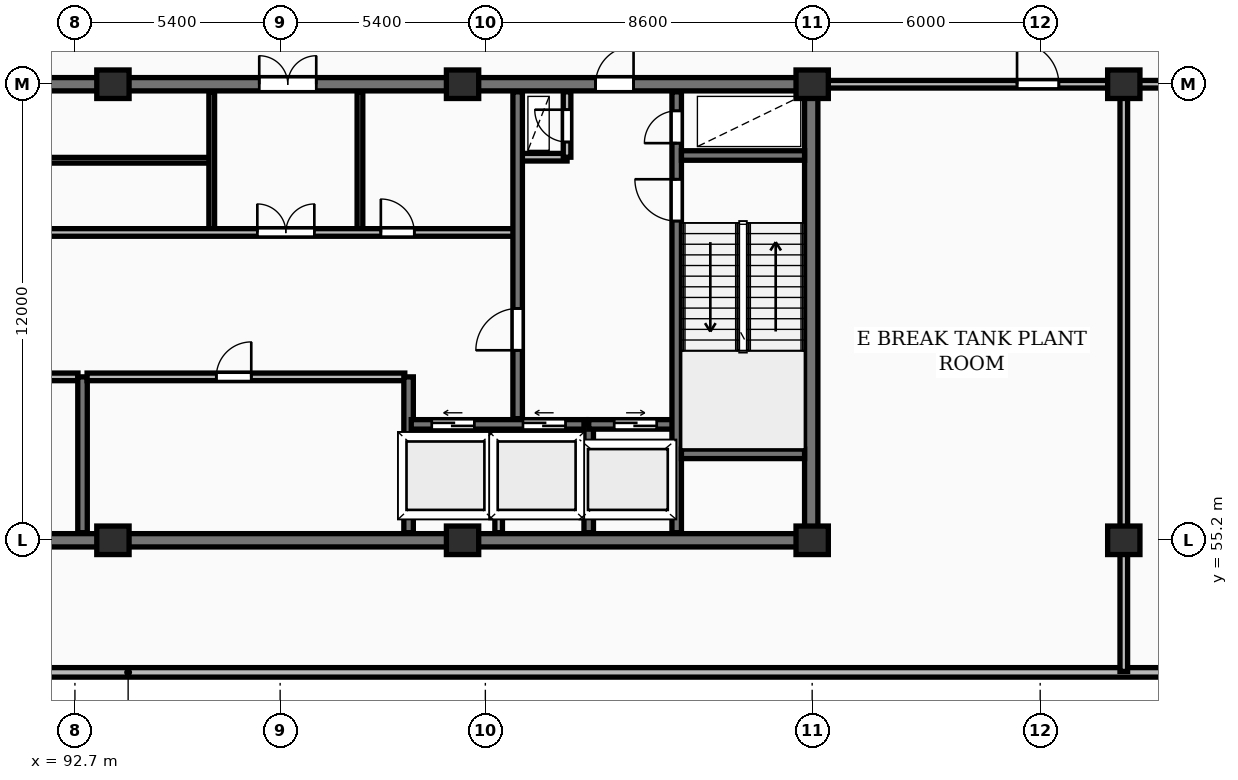
"""IFC4 building model, lengths in metres.
Left out: names, types, materials, properties, quantities, classifications, styles, units other than length and angle.
Written with IfcOpenShell. Run it as: python <this file> out.ifc"""

import sys

from ifc_helpers import new_model, si_unit, direction, frame, frame_2d, origin, origin_2d, place, context, subcontext, project, spatial, rectangle, extrude, element, fill, save


model = new_model("IFC4")
c1 = context("Model", 3, precision=1e-05, world=origin(), true_north=direction((0.0, 1.0)))
c2 = subcontext(c1, "Body", "Model", "MODEL_VIEW")
j1 = project(units=[si_unit("LENGTHUNIT", "METRE"), si_unit("PLANEANGLEUNIT", "RADIAN")], contexts=[c1])
p1 = place(None, origin())
s1 = spatial("IfcSite", under=j1, at=p1, CompositionType="ELEMENT")
p2 = place(p1, origin())
s2 = spatial("IfcBuilding", under=s1, at=p2, CompositionType="ELEMENT")
p3 = place(p2, frame((0.0, 0.0, 223.85)))
s3 = spatial("IfcBuildingStorey", under=s2, at=p3, CompositionType="ELEMENT", Elevation=223.85)
for number, where, z_axis, x_axis in (
    (1, (93.7, 55.2, 0.0), (0.0, 0.0, 1.0), (1.0, 0.0, 0.0)),
    (2, (93.7, 67.2, 0.0), (0.0, 0.0, 1.0), (1.0, 0.0, 0.0)),
    (3, (102.9, 55.2, 0.0), (0.0, 0.0, 1.0), (1.0, 0.0, 0.0)),
    (4, (102.9, 67.2, 0.0), (0.0, 0.0, 1.0), (1.0, 0.0, 0.0)),
    (5, (112.1, 55.2, 0.0), (0.0, 0.0, 1.0), (1.0, 0.0, 0.0)),
    (6, (112.1, 67.2, 0.0), (0.0, 0.0, 1.0), (1.0, 0.0, 0.0)),
    (7, (120.3, 55.2, 0.0), (0.0, 0.0, 1.0), (1.0, 0.0, 0.0)),
    (8, (120.3, 67.2, 0.0), (0.0, 0.0, 1.0), (1.0, 0.0, 0.0)),
):
    element("IfcColumn", number, at=place(p3, frame(where, z_axis=z_axis, x_axis=x_axis)), inside=s3, PredefinedType="COLUMN", context=c2, shape_type="SweptSolid", body=[
        extrude(rectangle(XDim=0.85, YDim=0.75, at=origin_2d()), origin(), (0.0, 0.0, 1.0), 4.8),
    ])
p4 = place(p3, frame((59.8, 51.725, 0.0), z_axis=(0.0, 0.0, 1.0), x_axis=(1.0, 0.0, 0.0)))
e9 = element("IfcWall", 9, at=p4, inside=s3, PredefinedType="SHEAR", context=c2, shape_type="SweptSolid", body=[
    extrude(rectangle(XDim=68.6, YDim=0.25, at=frame_2d((34.3, 0.0))), origin(), (0.0, 0.0, 1.0), 4.48),
])
p5 = place(p3, frame((75.95, 55.2, 0.0), z_axis=(0.0, 0.0, 1.0), x_axis=(1.0, 0.0, 0.0)))
e10 = element("IfcWall", 10, at=p5, inside=s3, PredefinedType="SHEAR", context=c2, shape_type="SweptSolid", body=[
    extrude(rectangle(XDim=36.3, YDim=0.35, at=frame_2d((18.15, 0.0))), origin(), (0.0, 0.0, 1.0), 4.8),
])
p6 = place(p3, frame((112.075, 55.375, 0.0), z_axis=(0.0, 0.0, 1.0), x_axis=(0.0, 1.0, 0.0)))
e11 = element("IfcWall", 11, at=p6, inside=s3, PredefinedType="SHEAR", context=c2, shape_type="SweptSolid", body=[
    extrude(rectangle(XDim=11.65, YDim=0.35, at=frame_2d((5.825, 0.0))), origin(), (0.0, 0.0, 1.0), 4.8),
])
p7 = place(p3, frame((75.95, 67.2, 0.0), z_axis=(0.0, 0.0, 1.0), x_axis=(1.0, 0.0, 0.0)))
e12 = element("IfcWall", 12, at=p7, inside=s3, PredefinedType="SHEAR", context=c2, shape_type="SweptSolid", body=[
    extrude(rectangle(XDim=36.3, YDim=0.35, at=frame_2d((18.15, 0.0))), origin(), (0.0, 0.0, 1.0), 4.8),
])
p8 = place(p7, frame((5.25, 0.0, 0.0)))
e13 = element("IfcOpeningElement", 13, at=p8, cuts=e12, PredefinedType="OPENING", context=c2, shape_type="SweptSolid", body=[
    extrude(rectangle(XDim=1.0, YDim=2.15, at=frame_2d((0.5, 1.075))), frame((0.0, 0.185, 0.0), z_axis=(0.0, -1.0, 0.0), x_axis=(1.0, 0.0, 0.0)), (0.0, 0.0, 1.0), 0.37),
])
p9 = place(p7, frame((21.6, 0.0, 0.0)))
e14 = element("IfcOpeningElement", 14, at=p9, cuts=e12, PredefinedType="OPENING", context=c2, shape_type="SweptSolid", body=[
    extrude(rectangle(XDim=1.5, YDim=2.2, at=frame_2d((0.75, 1.1))), frame((0.0, 0.185, 0.0), z_axis=(0.0, -1.0, 0.0), x_axis=(1.0, 0.0, 0.0)), (0.0, 0.0, 1.0), 0.37),
])
p10 = place(p7, frame((30.45, 0.0, 0.0)))
e15 = element("IfcOpeningElement", 15, at=p10, cuts=e12, PredefinedType="OPENING", context=c2, shape_type="SweptSolid", body=[
    extrude(rectangle(XDim=1.0, YDim=2.15, at=frame_2d((0.5, 1.075))), frame((0.0, 0.185, 0.0), z_axis=(0.0, -1.0, 0.0), x_axis=(1.0, 0.0, 0.0)), (0.0, 0.0, 1.0), 0.37),
])
p11 = place(p3, frame((84.42, 59.5, 0.0), z_axis=(0.0, 0.0, 1.0), x_axis=(1.0, 0.0, 0.0)))
e16 = element("IfcWall", 16, at=p11, inside=s3, PredefinedType="PARTITIONING", context=c2, shape_type="SweptSolid", body=[
    extrude(rectangle(XDim=8.36, YDim=0.2, at=frame_2d((4.18, 0.0))), origin(), (0.0, 0.0, 1.0), 4.48),
])
p12 = place(p11, frame((3.4, 0.0, 0.0)))
e17 = element("IfcOpeningElement", 17, at=p12, cuts=e16, PredefinedType="OPENING", context=c2, shape_type="SweptSolid", body=[
    extrude(rectangle(XDim=0.92, YDim=2.08, at=frame_2d((0.46, 1.04))), frame((0.0, 0.11, 0.0), z_axis=(0.0, -1.0, 0.0), x_axis=(1.0, 0.0, 0.0)), (0.0, 0.0, 1.0), 0.22),
])
p13 = place(p3, frame((92.9, 55.4, 0.0), z_axis=(0.0, 0.0, 1.0), x_axis=(0.0, 1.0, 0.0)))
e18 = element("IfcWall", 18, at=p13, inside=s3, PredefinedType="SHEAR", context=c2, shape_type="SweptSolid", body=[
    extrude(rectangle(XDim=4.1, YDim=0.25, at=frame_2d((2.05, 0.0))), origin(), (0.0, 0.0, 1.0), 4.8),
])
p14 = place(p3, frame((93.02, 59.5, 0.0), z_axis=(0.0, 0.0, 1.0), x_axis=(1.0, 0.0, 0.0)))
e19 = element("IfcWall", 19, at=p14, inside=s3, PredefinedType="PARTITIONING", context=c2, shape_type="SweptSolid", body=[
    extrude(rectangle(XDim=8.36, YDim=0.2, at=frame_2d((4.18, 0.0))), origin(), (0.0, 0.0, 1.0), 4.48),
])
p15 = place(p14, frame((3.4, 0.0, 0.0)))
e20 = element("IfcOpeningElement", 20, at=p15, cuts=e19, PredefinedType="OPENING", context=c2, shape_type="SweptSolid", body=[
    extrude(rectangle(XDim=0.92, YDim=2.08, at=frame_2d((0.46, 1.04))), frame((0.0, 0.11, 0.0), z_axis=(0.0, -1.0, 0.0), x_axis=(1.0, 0.0, 0.0)), (0.0, 0.0, 1.0), 0.22),
])
p16 = place(p3, frame((101.48, 55.4, 0.0), z_axis=(0.0, 0.0, 1.0), x_axis=(0.0, 1.0, 0.0)))
e21 = element("IfcWall", 21, at=p16, inside=s3, PredefinedType="SHEAR", context=c2, shape_type="SweptSolid", body=[
    extrude(rectangle(XDim=4.1, YDim=0.25, at=frame_2d((2.05, 0.0))), origin(), (0.0, 0.0, 1.0), 4.8),
])
p17 = place(p3, frame((103.85, 55.4, 0.0), z_axis=(0.0, 0.0, 1.0), x_axis=(0.0, 1.0, 0.0)))
e22 = element("IfcWall", 22, at=p17, inside=s3, PredefinedType="PARTITIONING", context=c2, shape_type="SweptSolid", body=[
    extrude(rectangle(XDim=2.72, YDim=0.2, at=frame_2d((1.36, 0.0))), origin(), (0.0, 0.0, 1.0), 4.48),
])
p18 = place(p3, frame((101.55, 58.25, 0.0), z_axis=(0.0, 0.0, 1.0), x_axis=(1.0, 0.0, 0.0)))
e23 = element("IfcWall", 23, at=p18, inside=s3, PredefinedType="SHEAR", context=c2, shape_type="SweptSolid", body=[
    extrude(rectangle(XDim=4.6, YDim=0.25, at=frame_2d((2.3, 0.0))), origin(), (0.0, 0.0, 1.0), 4.8),
])
p19 = place(p18, frame((0.54, 0.0, 0.0)))
e24 = element("IfcOpeningElement", 24, at=p19, cuts=e23, PredefinedType="OPENING", context=c2, shape_type="SweptSolid", body=[
    extrude(rectangle(XDim=1.12, YDim=2.12, at=frame_2d((0.56, 1.06))), frame((0.0, 0.135, 0.0), z_axis=(0.0, -1.0, 0.0), x_axis=(1.0, 0.0, 0.0)), (0.0, 0.0, 1.0), 0.27),
])
p20 = place(p18, frame((2.94, 0.0, 0.0)))
e25 = element("IfcOpeningElement", 25, at=p20, cuts=e23, PredefinedType="OPENING", context=c2, shape_type="SweptSolid", body=[
    extrude(rectangle(XDim=1.12, YDim=2.12, at=frame_2d((0.56, 1.06))), frame((0.0, 0.135, 0.0), z_axis=(0.0, -1.0, 0.0), x_axis=(1.0, 0.0, 0.0)), (0.0, 0.0, 1.0), 0.27),
])
p21 = place(p3, frame((106.22, 55.4, 0.0), z_axis=(0.0, 0.0, 1.0), x_axis=(0.0, 1.0, 0.0)))
e26 = element("IfcWall", 26, at=p21, inside=s3, PredefinedType="SHEAR", context=c2, shape_type="SweptSolid", body=[
    extrude(rectangle(XDim=2.85, YDim=0.25, at=frame_2d((1.425, 0.0))), origin(), (0.0, 0.0, 1.0), 4.8),
])
p22 = place(p3, frame((106.22, 58.25, 0.0), z_axis=(0.0, 0.0, 1.0), x_axis=(1.0, 0.0, 0.0)))
e27 = element("IfcWall", 27, at=p22, inside=s3, PredefinedType="SHEAR", context=c2, shape_type="SweptSolid", body=[
    extrude(rectangle(XDim=2.46, YDim=0.25, at=frame_2d((1.23, 0.0))), origin(), (0.0, 0.0, 1.0), 4.8),
])
p23 = place(p22, frame((0.67, 0.0, 0.0)))
e28 = element("IfcOpeningElement", 28, at=p23, cuts=e27, PredefinedType="OPENING", context=c2, shape_type="SweptSolid", body=[
    extrude(rectangle(XDim=1.12, YDim=2.12, at=frame_2d((0.56, 1.06))), frame((0.0, 0.135, 0.0), z_axis=(0.0, -1.0, 0.0), x_axis=(1.0, 0.0, 0.0)), (0.0, 0.0, 1.0), 0.27),
])
p24 = place(p3, frame((89.25, 65.2, 0.0), z_axis=(0.0, 0.0, 1.0), x_axis=(1.0, 0.0, 0.0)))
e29 = element("IfcWall", 29, at=p24, inside=s3, PredefinedType="PARTITIONING", context=c2, shape_type="SweptSolid", body=[
    extrude(rectangle(XDim=7.05, YDim=0.15, at=frame_2d((3.525, 0.0))), origin(), (0.0, 0.0, 1.0), 4.48),
])
p25 = place(p24, frame((1.6, 0.0, 0.0)))
e30 = element("IfcOpeningElement", 30, at=p25, cuts=e29, PredefinedType="OPENING", context=c2, shape_type="SweptSolid", body=[
    extrude(rectangle(XDim=0.88, YDim=2.06, at=frame_2d((0.44, 1.03))), frame((0.0, 0.085, 0.0), z_axis=(0.0, -1.0, 0.0), x_axis=(1.0, 0.0, 0.0)), (0.0, 0.0, 1.0), 0.17),
])
for number, where, z_axis, x_axis in (
    (31, (96.3, 63.4, 0.0), (0.0, 0.0, 1.0), (0.0, 1.0, 0.0)),
    (32, (100.2, 63.4, 0.0), (0.0, 0.0, 1.0), (0.0, 1.0, 0.0)),
):
    element("IfcWall", number, at=place(p3, frame(where, z_axis=z_axis, x_axis=x_axis)), inside=s3, PredefinedType="PARTITIONING", context=c2, shape_type="SweptSolid", body=[
        extrude(rectangle(XDim=3.6, YDim=0.15, at=frame_2d((1.8, 0.0))), origin(), (0.0, 0.0, 1.0), 4.48),
    ])
p26 = place(p3, frame((84.42, 63.3, 0.0), z_axis=(0.0, 0.0, 1.0), x_axis=(1.0, 0.0, 0.0)))
e33 = element("IfcWall", 33, at=p26, inside=s3, PredefinedType="PARTITIONING", context=c2, shape_type="SweptSolid", body=[
    extrude(rectangle(XDim=19.83, YDim=0.2, at=frame_2d((9.915, 0.0))), origin(), (0.0, 0.0, 1.0), 4.48),
])
p27 = place(p26, frame((1.15, 0.0, 0.0)))
e34 = element("IfcOpeningElement", 34, at=p27, cuts=e33, PredefinedType="OPENING", context=c2, shape_type="SweptSolid", body=[
    extrude(rectangle(XDim=0.85, YDim=2.05, at=frame_2d((0.425, 1.025))), frame((0.0, 0.11, 0.0), z_axis=(0.0, -1.0, 0.0), x_axis=(1.0, 0.0, 0.0)), (0.0, 0.0, 1.0), 0.22),
])
p28 = place(p26, frame((3.25, 0.0, 0.0)))
e35 = element("IfcOpeningElement", 35, at=p28, cuts=e33, PredefinedType="OPENING", context=c2, shape_type="SweptSolid", body=[
    extrude(rectangle(XDim=0.85, YDim=2.05, at=frame_2d((0.425, 1.025))), frame((0.0, 0.11, 0.0), z_axis=(0.0, -1.0, 0.0), x_axis=(1.0, 0.0, 0.0)), (0.0, 0.0, 1.0), 0.22),
])
p29 = place(p26, frame((13.08, 0.0, 0.0)))
e36 = element("IfcOpeningElement", 36, at=p29, cuts=e33, PredefinedType="OPENING", context=c2, shape_type="SweptSolid", body=[
    extrude(rectangle(XDim=1.5, YDim=2.2, at=frame_2d((0.75, 1.1))), frame((0.0, 0.11, 0.0), z_axis=(0.0, -1.0, 0.0), x_axis=(1.0, 0.0, 0.0)), (0.0, 0.0, 1.0), 0.22),
])
p30 = place(p26, frame((6.68, 0.0, 0.0)))
e37 = element("IfcOpeningElement", 37, at=p30, cuts=e33, PredefinedType="OPENING", context=c2, shape_type="SweptSolid", body=[
    extrude(rectangle(XDim=0.92, YDim=2.08, at=frame_2d((0.46, 1.04))), frame((0.0, 0.11, 0.0), z_axis=(0.0, -1.0, 0.0), x_axis=(1.0, 0.0, 0.0)), (0.0, 0.0, 1.0), 0.22),
])
p31 = place(p26, frame((16.33, 0.0, 0.0)))
e38 = element("IfcOpeningElement", 38, at=p31, cuts=e33, PredefinedType="OPENING", context=c2, shape_type="SweptSolid", body=[
    extrude(rectangle(XDim=0.88, YDim=2.06, at=frame_2d((0.44, 1.03))), frame((0.0, 0.11, 0.0), z_axis=(0.0, -1.0, 0.0), x_axis=(1.0, 0.0, 0.0)), (0.0, 0.0, 1.0), 0.22),
])
p32 = place(p3, frame((104.45, 65.28, 0.0), z_axis=(0.0, 0.0, 1.0), x_axis=(1.0, 0.0, 0.0)))
e39 = element("IfcWall", 39, at=p32, inside=s3, PredefinedType="PARTITIONING", context=c2, shape_type="SweptSolid", body=[
    extrude(rectangle(XDim=1.2, YDim=0.2, at=frame_2d((0.6, 0.0))), origin(), (0.0, 0.0, 1.0), 4.48),
])
p33 = place(p3, frame((105.65, 65.28, 0.0), z_axis=(0.0, 0.0, 1.0), x_axis=(0.0, 1.0, 0.0)))
e40 = element("IfcWall", 40, at=p33, inside=s3, PredefinedType="PARTITIONING", context=c2, shape_type="SweptSolid", body=[
    extrude(rectangle(XDim=1.72, YDim=0.2, at=frame_2d((0.86, 0.0))), origin(), (0.0, 0.0, 1.0), 4.48),
])
p34 = place(p33, frame((0.4, 0.0, 0.0)))
e41 = element("IfcOpeningElement", 41, at=p34, cuts=e40, PredefinedType="OPENING", context=c2, shape_type="SweptSolid", body=[
    extrude(rectangle(XDim=0.85, YDim=2.05, at=frame_2d((0.425, 1.025))), frame((0.0, 0.11, 0.0), z_axis=(0.0, -1.0, 0.0), x_axis=(1.0, 0.0, 0.0)), (0.0, 0.0, 1.0), 0.22),
])
p35 = place(p3, frame((104.35, 58.4, 0.0), z_axis=(0.0, 0.0, 1.0), x_axis=(0.0, 1.0, 0.0)))
e42 = element("IfcWall", 42, at=p35, inside=s3, PredefinedType="SHEAR", context=c2, shape_type="SweptSolid", body=[
    extrude(rectangle(XDim=8.6, YDim=0.25, at=frame_2d((4.3, 0.0))), origin(), (0.0, 0.0, 1.0), 4.8),
])
p36 = place(p35, frame((1.8, 0.0, 0.0)))
e43 = element("IfcOpeningElement", 43, at=p36, cuts=e42, PredefinedType="OPENING", context=c2, shape_type="SweptSolid", body=[
    extrude(rectangle(XDim=1.1, YDim=2.1, at=frame_2d((0.55, 1.05))), frame((0.0, 0.135, 0.0), z_axis=(0.0, -1.0, 0.0), x_axis=(1.0, 0.0, 0.0)), (0.0, 0.0, 1.0), 0.27),
])
p37 = place(p3, frame((108.535, 55.4, 0.0), z_axis=(0.0, 0.0, 1.0), x_axis=(0.0, 1.0, 0.0)))
e44 = element("IfcWall", 44, at=p37, inside=s3, PredefinedType="SHEAR", context=c2, shape_type="SweptSolid", body=[
    extrude(rectangle(XDim=11.6, YDim=0.25, at=frame_2d((5.8, 0.0))), origin(), (0.0, 0.0, 1.0), 4.8),
])
p38 = place(p37, frame((8.2, 0.0, 0.0)))
e45 = element("IfcOpeningElement", 45, at=p38, cuts=e44, PredefinedType="OPENING", context=c2, shape_type="SweptSolid", body=[
    extrude(rectangle(XDim=1.1, YDim=2.1, at=frame_2d((0.55, 1.05))), frame((0.0, 0.135, 0.0), z_axis=(0.0, -1.0, 0.0), x_axis=(1.0, 0.0, 0.0)), (0.0, 0.0, 1.0), 0.27),
])
p39 = place(p37, frame((10.25, 0.0, 0.0)))
e46 = element("IfcOpeningElement", 46, at=p39, cuts=e44, PredefinedType="OPENING", context=c2, shape_type="SweptSolid", body=[
    extrude(rectangle(XDim=0.85, YDim=2.05, at=frame_2d((0.425, 1.025))), frame((0.0, 0.135, 0.0), z_axis=(0.0, -1.0, 0.0), x_axis=(1.0, 0.0, 0.0)), (0.0, 0.0, 1.0), 0.27),
])
for number, where, z_axis, x_axis in (
    (47, (108.66, 57.475, 0.0), (0.0, 0.0, 1.0), (1.0, 0.0, 0.0)),
    (48, (108.66, 65.325, 0.0), (0.0, 0.0, 1.0), (1.0, 0.0, 0.0)),
):
    element("IfcWall", number, at=place(p3, frame(where, z_axis=z_axis, x_axis=x_axis)), inside=s3, PredefinedType="SHEAR", context=c2, shape_type="SweptSolid", body=[
        extrude(rectangle(XDim=3.24, YDim=0.25, at=frame_2d((1.62, 0.0))), origin(), (0.0, 0.0, 1.0), 4.8),
    ])
p40 = place(p3, frame((120.3, 51.75, 0.0), z_axis=(0.0, 0.0, 1.0), x_axis=(0.0, 1.0, 0.0)))
e49 = element("IfcWall", 49, at=p40, inside=s3, PredefinedType="PARTITIONING", context=c2, shape_type="SweptSolid", body=[
    extrude(rectangle(XDim=15.4, YDim=0.2, at=frame_2d((7.7, 0.0))), origin(), (0.0, 0.0, 1.0), 3.23),
])
p41 = place(p3, frame((112.25, 67.2, 0.0), z_axis=(0.0, 0.0, 1.0), x_axis=(1.0, 0.0, 0.0)))
e50 = element("IfcWall", 50, at=p41, inside=s3, PredefinedType="PARTITIONING", context=c2, shape_type="SweptSolid", body=[
    extrude(rectangle(XDim=16.1, YDim=0.2, at=frame_2d((8.05, 0.0))), origin(), (0.0, 0.0, 1.0), 3.23),
])
p42 = place(p41, frame((5.241, 0.0, 0.0)))
e51 = element("IfcOpeningElement", 51, at=p42, cuts=e50, PredefinedType="OPENING", context=c2, shape_type="SweptSolid", body=[
    extrude(rectangle(XDim=1.1, YDim=2.1, at=frame_2d((0.55, 1.05))), frame((0.0, 0.11, 0.0), z_axis=(0.0, -1.0, 0.0), x_axis=(1.0, 0.0, 0.0)), (0.0, 0.0, 1.0), 0.22),
])
p43 = place(p41, frame((9.77, 0.0, 0.0)))
e52 = element("IfcOpeningElement", 52, at=p43, cuts=e50, PredefinedType="OPENING", context=c2, shape_type="SweptSolid", body=[
    extrude(rectangle(XDim=1.1, YDim=2.1, at=frame_2d((0.55, 1.05))), frame((0.0, 0.11, 0.0), z_axis=(0.0, -1.0, 0.0), x_axis=(1.0, 0.0, 0.0)), (0.0, 0.0, 1.0), 0.22),
])
p44 = place(p9, origin())
e53 = element("IfcDoor", 53, at=p44, inside=s3, OperationType="DOUBLE_DOOR_SINGLE_SWING", PredefinedType="DOOR", context=c2, shape_type="SweptSolid", body=[
    extrude(rectangle(XDim=1.5, YDim=2.2, at=frame_2d((0.75, 1.1))), frame((0.0, 0.025, 0.0), z_axis=(0.0, -1.0, 0.0), x_axis=(1.0, 0.0, 0.0)), (0.0, 0.0, 1.0), 0.05),
])
fill(e14, e53)
p45 = place(p10, origin())
e54 = element("IfcDoor", 54, at=p45, inside=s3, OperationType="SINGLE_SWING_RIGHT", PredefinedType="DOOR", context=c2, shape_type="SweptSolid", body=[
    extrude(rectangle(XDim=1.0, YDim=2.15, at=frame_2d((0.5, 1.075))), frame((0.0, 0.025, 0.0), z_axis=(0.0, -1.0, 0.0), x_axis=(1.0, 0.0, 0.0)), (0.0, 0.0, 1.0), 0.05),
])
fill(e15, e54)
p46 = place(p15, origin())
e55 = element("IfcDoor", 55, at=p46, inside=s3, OperationType="SINGLE_SWING_RIGHT", PredefinedType="DOOR", context=c2, shape_type="SweptSolid", body=[
    extrude(rectangle(XDim=0.92, YDim=2.08, at=frame_2d((0.46, 1.04))), frame((0.0, 0.025, 0.0), z_axis=(0.0, -1.0, 0.0), x_axis=(1.0, 0.0, 0.0)), (0.0, 0.0, 1.0), 0.05),
])
fill(e20, e55)
p47 = place(p19, origin())
e56 = element("IfcDoor", 56, at=p47, inside=s3, OperationType="SLIDING_TO_LEFT", PredefinedType="DOOR", context=c2, shape_type="SweptSolid", body=[
    extrude(rectangle(XDim=1.12, YDim=2.12, at=frame_2d((0.56, 1.06))), frame((0.0, 0.025, 0.0), z_axis=(0.0, -1.0, 0.0), x_axis=(1.0, 0.0, 0.0)), (0.0, 0.0, 1.0), 0.05),
])
fill(e24, e56)
p48 = place(p20, origin())
e57 = element("IfcDoor", 57, at=p48, inside=s3, OperationType="SLIDING_TO_LEFT", PredefinedType="DOOR", context=c2, shape_type="SweptSolid", body=[
    extrude(rectangle(XDim=1.12, YDim=2.12, at=frame_2d((0.56, 1.06))), frame((0.0, 0.025, 0.0), z_axis=(0.0, -1.0, 0.0), x_axis=(1.0, 0.0, 0.0)), (0.0, 0.0, 1.0), 0.05),
])
fill(e25, e57)
p49 = place(p23, origin())
e58 = element("IfcDoor", 58, at=p49, inside=s3, OperationType="SLIDING_TO_RIGHT", PredefinedType="DOOR", context=c2, shape_type="SweptSolid", body=[
    extrude(rectangle(XDim=1.12, YDim=2.12, at=frame_2d((0.56, 1.06))), frame((0.0, 0.025, 0.0), z_axis=(0.0, -1.0, 0.0), x_axis=(1.0, 0.0, 0.0)), (0.0, 0.0, 1.0), 0.05),
])
fill(e28, e58)
p50 = place(p29, origin())
e59 = element("IfcDoor", 59, at=p50, inside=s3, OperationType="DOUBLE_DOOR_SINGLE_SWING", PredefinedType="DOOR", context=c2, shape_type="SweptSolid", body=[
    extrude(rectangle(XDim=1.5, YDim=2.2, at=frame_2d((0.75, 1.1))), frame((0.0, 0.025, 0.0), z_axis=(0.0, -1.0, 0.0), x_axis=(1.0, 0.0, 0.0)), (0.0, 0.0, 1.0), 0.05),
])
fill(e36, e59)
p51 = place(p31, origin())
e60 = element("IfcDoor", 60, at=p51, inside=s3, OperationType="SINGLE_SWING_LEFT", PredefinedType="DOOR", context=c2, shape_type="SweptSolid", body=[
    extrude(rectangle(XDim=0.88, YDim=2.06, at=frame_2d((0.44, 1.03))), frame((0.0, 0.025, 0.0), z_axis=(0.0, -1.0, 0.0), x_axis=(1.0, 0.0, 0.0)), (0.0, 0.0, 1.0), 0.05),
])
fill(e38, e60)
p52 = place(p34, origin())
e61 = element("IfcDoor", 61, at=p52, inside=s3, OperationType="SINGLE_SWING_RIGHT", PredefinedType="DOOR", context=c2, shape_type="SweptSolid", body=[
    extrude(rectangle(XDim=0.85, YDim=2.05, at=frame_2d((0.425, 1.025))), frame((0.0, 0.025, 0.0), z_axis=(0.0, -1.0, 0.0), x_axis=(1.0, 0.0, 0.0)), (0.0, 0.0, 1.0), 0.05),
])
fill(e41, e61)
p53 = place(p36, origin())
e62 = element("IfcDoor", 62, at=p53, inside=s3, OperationType="SINGLE_SWING_LEFT", PredefinedType="DOOR", context=c2, shape_type="SweptSolid", body=[
    extrude(rectangle(XDim=1.1, YDim=2.1, at=frame_2d((0.55, 1.05))), frame((0.0, 0.025, 0.0), z_axis=(0.0, -1.0, 0.0), x_axis=(1.0, 0.0, 0.0)), (0.0, 0.0, 1.0), 0.05),
])
fill(e43, e62)
p54 = place(p38, origin())
e63 = element("IfcDoor", 63, at=p54, inside=s3, OperationType="SINGLE_SWING_RIGHT", PredefinedType="DOOR", context=c2, shape_type="SweptSolid", body=[
    extrude(rectangle(XDim=1.1, YDim=2.1, at=frame_2d((0.55, 1.05))), frame((0.0, 0.025, 0.0), z_axis=(0.0, -1.0, 0.0), x_axis=(1.0, 0.0, 0.0)), (0.0, 0.0, 1.0), 0.05),
])
fill(e45, e63)
p55 = place(p39, origin())
e64 = element("IfcDoor", 64, at=p55, inside=s3, OperationType="SINGLE_SWING_LEFT", PredefinedType="DOOR", context=c2, shape_type="SweptSolid", body=[
    extrude(rectangle(XDim=0.85, YDim=2.05, at=frame_2d((0.425, 1.025))), frame((0.0, 0.025, 0.0), z_axis=(0.0, -1.0, 0.0), x_axis=(1.0, 0.0, 0.0)), (0.0, 0.0, 1.0), 0.05),
])
fill(e46, e64)
p56 = place(p42, origin())
e65 = element("IfcDoor", 65, at=p56, inside=s3, OperationType="SINGLE_SWING_LEFT", PredefinedType="DOOR", context=c2, shape_type="SweptSolid", body=[
    extrude(rectangle(XDim=1.1, YDim=2.1, at=frame_2d((0.55, 1.05))), frame((0.0, 0.025, 0.0), z_axis=(0.0, -1.0, 0.0), x_axis=(1.0, 0.0, 0.0)), (0.0, 0.0, 1.0), 0.05),
])
fill(e51, e65)
save(model, sys.argv[1])
